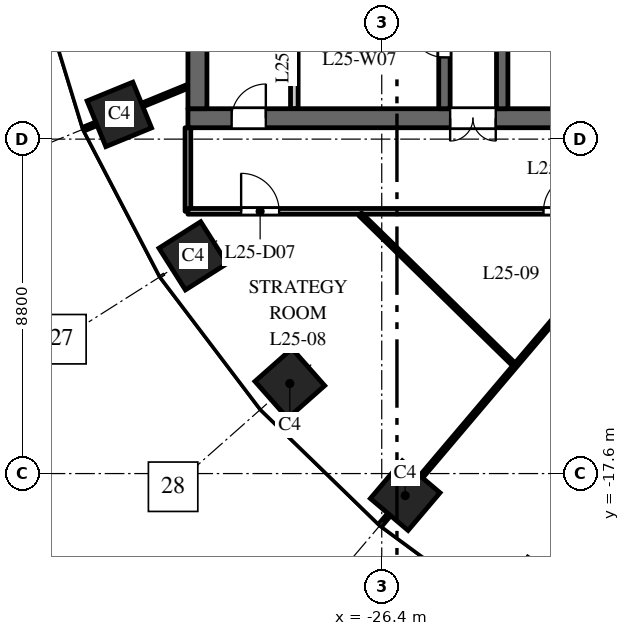
"""IFC4 building model, lengths in metres.
Left out: names, types, materials, properties, quantities, classifications, styles, units other than length and angle.
Written with IfcOpenShell. Run it as: python <this file> out.ifc"""

import sys

from ifc_helpers import new_model, si_unit, direction, frame, frame_2d, origin, origin_2d, place, context, subcontext, project, spatial, rectangle, extrude, element, fill, save


model = new_model("IFC4")
c1 = context("Model", 3, precision=1e-05, world=origin(), true_north=direction((0.0, 1.0)))
c2 = subcontext(c1, "Body", "Model", "MODEL_VIEW")
j1 = project(units=[si_unit("LENGTHUNIT", "METRE"), si_unit("PLANEANGLEUNIT", "RADIAN")], contexts=[c1])
p1 = place(None, origin())
s1 = spatial("IfcSite", under=j1, at=p1, CompositionType="ELEMENT")
p2 = place(p1, origin())
s2 = spatial("IfcBuilding", under=s1, at=p2, CompositionType="ELEMENT")
p3 = place(p2, frame((0.0, 0.0, 112.0)))
s3 = spatial("IfcBuildingStorey", under=s2, at=p3, CompositionType="ELEMENT", Elevation=112.0)
for number, where, z_axis, x_axis in (
    (1, (-33.305, -8.149, 0.0), (0.0, 0.0, 1.0), (0.379, -0.925, 0.0)),
    (2, (-31.365, -11.871, 0.0), (0.0, 0.0, 1.0), (0.535, -0.845, 0.0)),
    (3, (-28.819, -15.23, 0.0), (0.0, 0.0, 1.0), (0.663, -0.749, 0.0)),
    (4, (-25.783, -18.18, 0.0), (0.0, 0.0, 1.0), (0.763, -0.646, 0.0)),
):
    element("IfcColumn", number, at=place(p3, frame(where, z_axis=z_axis, x_axis=x_axis)), inside=s3, PredefinedType="COLUMN", context=c2, shape_type="SweptSolid", body=[
        extrude(rectangle(XDim=1.3, YDim=1.3, at=origin_2d()), origin(), (0.0, 0.0, 1.0), 4.0),
    ])
p4 = place(p3, frame((-16.5, -8.25, 0.0), z_axis=(0.0, 0.0, 1.0), x_axis=(-1.0, 0.0, 0.0)))
e5 = element("IfcWall", 5, at=p4, inside=s3, PredefinedType="SHEAR", context=c2, shape_type="SweptSolid", body=[
    extrude(rectangle(XDim=15.0, YDim=0.5, at=frame_2d((7.5, 0.0))), origin(), (0.0, 0.0, 1.0), 3.7),
])
p5 = place(p4, frame((6.9, 0.0, 0.0)))
e6 = element("IfcOpeningElement", 6, at=p5, cuts=e5, PredefinedType="OPENING", context=c2, shape_type="SweptSolid", body=[
    extrude(rectangle(XDim=1.2, YDim=2.1, at=frame_2d((0.6, 1.05))), frame((0.0, 0.26, 0.0), z_axis=(0.0, -1.0, 0.0), x_axis=(1.0, 0.0, 0.0)), (0.0, 0.0, 1.0), 0.52),
])
p6 = place(p4, frame((12.95, 0.0, 0.0)))
e7 = element("IfcOpeningElement", 7, at=p6, cuts=e5, PredefinedType="OPENING", context=c2, shape_type="SweptSolid", body=[
    extrude(rectangle(XDim=0.9, YDim=2.1, at=frame_2d((0.45, 1.05))), frame((0.0, 0.26, 0.0), z_axis=(0.0, -1.0, 0.0), x_axis=(1.0, 0.0, 0.0)), (0.0, 0.0, 1.0), 0.52),
])
p7 = place(p3, frame((-24.75, -8.0, 0.0), z_axis=(0.0, 0.0, 1.0), x_axis=(0.0, 1.0, 0.0)))
e8 = element("IfcWall", 8, at=p7, inside=s3, PredefinedType="SHEAR", context=c2, shape_type="SweptSolid", body=[
    extrude(rectangle(XDim=16.0, YDim=0.3, at=frame_2d((8.0, 0.0))), origin(), (0.0, 0.0, 1.0), 3.7),
])
p8 = place(p7, frame((4.425, 0.0, 0.0)))
e9 = element("IfcOpeningElement", 9, at=p8, cuts=e8, PredefinedType="OPENING", context=c2, shape_type="SweptSolid", body=[
    extrude(rectangle(XDim=1.1, YDim=2.1, at=frame_2d((0.55, 1.05))), frame((0.0, 0.16, 0.0), z_axis=(0.0, -1.0, 0.0), x_axis=(1.0, 0.0, 0.0)), (0.0, 0.0, 1.0), 0.32),
])
p9 = place(p7, frame((7.45, 0.0, 0.0)))
e10 = element("IfcOpeningElement", 10, at=p9, cuts=e8, PredefinedType="OPENING", context=c2, shape_type="SweptSolid", body=[
    extrude(rectangle(XDim=1.1, YDim=2.1, at=frame_2d((0.55, 1.05))), frame((0.0, 0.16, 0.0), z_axis=(0.0, -1.0, 0.0), x_axis=(1.0, 0.0, 0.0)), (0.0, 0.0, 1.0), 0.32),
])
p10 = place(p7, frame((10.425, 0.0, 0.0)))
e11 = element("IfcOpeningElement", 11, at=p10, cuts=e8, PredefinedType="OPENING", context=c2, shape_type="SweptSolid", body=[
    extrude(rectangle(XDim=1.2, YDim=2.1, at=frame_2d((0.6, 1.05))), frame((0.0, 0.16, 0.0), z_axis=(0.0, -1.0, 0.0), x_axis=(1.0, 0.0, 0.0)), (0.0, 0.0, 1.0), 0.32),
])
p11 = place(p7, frame((13.75, 0.0, 0.0)))
e12 = element("IfcOpeningElement", 12, at=p11, cuts=e8, PredefinedType="OPENING", context=c2, shape_type="SweptSolid", body=[
    extrude(rectangle(XDim=0.9, YDim=2.1, at=frame_2d((0.45, 1.05))), frame((0.0, 0.16, 0.0), z_axis=(0.0, -1.0, 0.0), x_axis=(1.0, 0.0, 0.0)), (0.0, 0.0, 1.0), 0.32),
])
p12 = place(p7, frame((1.35, 0.0, 0.0)))
e13 = element("IfcOpeningElement", 13, at=p12, cuts=e8, PredefinedType="OPENING", context=c2, shape_type="SweptSolid", body=[
    extrude(rectangle(XDim=0.9, YDim=2.1, at=frame_2d((0.45, 1.05))), frame((0.0, 0.16, 0.0), z_axis=(0.0, -1.0, 0.0), x_axis=(1.0, 0.0, 0.0)), (0.0, 0.0, 1.0), 0.32),
])
p13 = place(p3, frame((-31.25, -8.0, 0.0), z_axis=(0.0, 0.0, 1.0), x_axis=(0.0, 1.0, 0.0)))
e14 = element("IfcWall", 14, at=p13, inside=s3, PredefinedType="SHEAR", context=c2, shape_type="SweptSolid", body=[
    extrude(rectangle(XDim=16.0, YDim=0.5, at=frame_2d((8.0, 0.0))), origin(), (0.0, 0.0, 1.0), 3.7),
])
p14 = place(p3, frame((-28.7, -8.0, 0.0), z_axis=(0.0, 0.0, 1.0), x_axis=(0.0, 1.0, 0.0)))
e15 = element("IfcWall", 15, at=p14, inside=s3, PredefinedType="PARTITIONING", context=c2, shape_type="SweptSolid", body=[
    extrude(rectangle(XDim=3.25, YDim=0.2, at=frame_2d((1.625, 0.0))), origin(), (0.0, 0.0, 1.0), 3.7),
])
p15 = place(p3, frame((-23.23, -8.0, 0.0), z_axis=(0.0, 0.0, 1.0), x_axis=(0.0, 1.0, 0.0)))
e16 = element("IfcWall", 16, at=p15, inside=s3, PredefinedType="SHEAR", context=c2, shape_type="SweptSolid", body=[
    extrude(rectangle(XDim=7.875, YDim=0.3, at=frame_2d((3.938, 0.0))), origin(), (0.0, 0.0, 1.0), 3.7),
])
p16 = place(p15, frame((5.15, 0.0, 0.0)))
e17 = element("IfcOpeningElement", 17, at=p16, cuts=e16, PredefinedType="OPENING", context=c2, shape_type="SweptSolid", body=[
    extrude(rectangle(XDim=1.1, YDim=2.1, at=frame_2d((0.55, 1.05))), frame((0.0, 0.16, 0.0), z_axis=(0.0, -1.0, 0.0), x_axis=(1.0, 0.0, 0.0)), (0.0, 0.0, 1.0), 0.32),
])
p17 = place(p3, frame((-34.234, -8.53, 0.0), z_axis=(0.0, 0.0, 1.0), x_axis=(0.925344112436, 0.379128307542, 0.0)))
e18 = element("IfcWall", 18, at=p17, inside=s3, PredefinedType="PARTITIONING", context=c2, shape_type="SweptSolid", body=[
    extrude(rectangle(XDim=2.954, YDim=0.1, at=frame_2d((1.477, 0.0))), origin(), (0.0, 0.0, 1.0), 2.9),
])
p18 = place(p3, frame((-31.5, -10.7, 0.0), z_axis=(0.0, 0.0, 1.0), x_axis=(0.0, 1.0, 0.0)))
e19 = element("IfcWall", 19, at=p18, inside=s3, PredefinedType="PARTITIONING", context=c2, shape_type="SweptSolid", body=[
    extrude(rectangle(XDim=2.2, YDim=0.15, at=frame_2d((1.1, 0.0))), origin(), (0.0, 0.0, 1.0), 3.7),
])
p19 = place(p3, frame((-31.5, -10.7, 0.0), z_axis=(0.0, 0.0, 1.0), x_axis=(1.0, 0.0, 0.0)))
e20 = element("IfcWall", 20, at=p19, inside=s3, PredefinedType="PARTITIONING", context=c2, shape_type="SweptSolid", body=[
    extrude(rectangle(XDim=11.113, YDim=0.15, at=frame_2d((5.557, 0.0))), origin(), (0.0, 0.0, 1.0), 3.1),
])
p20 = place(p19, frame((1.4, 0.0, 0.0)))
e21 = element("IfcOpeningElement", 21, at=p20, cuts=e20, PredefinedType="OPENING", context=c2, shape_type="SweptSolid", body=[
    extrude(rectangle(XDim=1.0, YDim=2.1, at=frame_2d((0.5, 1.05))), frame((0.0, 0.085, 0.0), z_axis=(0.0, -1.0, 0.0), x_axis=(1.0, 0.0, 0.0)), (0.0, 0.0, 1.0), 0.17),
])
p21 = place(p19, frame((9.356, 0.0, 0.0)))
e22 = element("IfcOpeningElement", 22, at=p21, cuts=e20, PredefinedType="OPENING", context=c2, shape_type="SweptSolid", body=[
    extrude(rectangle(XDim=1.0, YDim=2.1, at=frame_2d((0.5, 1.05))), frame((0.0, 0.085, 0.0), z_axis=(0.0, -1.0, 0.0), x_axis=(1.0, 0.0, 0.0)), (0.0, 0.0, 1.0), 0.17),
])
p22 = place(p3, frame((-26.965, -10.778, 0.0), z_axis=(0.0, 0.0, 1.0), x_axis=(0.715118482903, -0.699003258512, 0.0)))
e23 = element("IfcWall", 23, at=p22, inside=s3, PredefinedType="PARTITIONING", context=c2, shape_type="SweptSolid", body=[
    extrude(rectangle(XDim=5.651, YDim=0.1, at=frame_2d((2.825, 0.0))), origin(), (0.0, 0.0, 1.0), 3.7),
])
p23 = place(p3, frame((-26.43, -18.945, 0.0), z_axis=(0.0, 0.0, 1.0), x_axis=(0.64633128205, 0.763056927, 0.0)))
e24 = element("IfcWall", 24, at=p23, inside=s3, PredefinedType="PARTITIONING", context=c2, shape_type="SweptSolid", body=[
    extrude(rectangle(XDim=10.069, YDim=0.1, at=frame_2d((5.034, 0.0))), origin(), (0.0, 0.0, 1.0), 3.7),
])
p24 = place(p5, origin())
e25 = element("IfcDoor", 25, at=p24, inside=s3, OperationType="DOUBLE_DOOR_DOUBLE_SWING", PredefinedType="DOOR", context=c2, shape_type="SweptSolid", body=[
    extrude(rectangle(XDim=1.2, YDim=2.1, at=frame_2d((0.6, 1.05))), frame((0.0, 0.025, 0.0), z_axis=(0.0, -1.0, 0.0), x_axis=(1.0, 0.0, 0.0)), (0.0, 0.0, 1.0), 0.05),
])
fill(e6, e25)
p25 = place(p12, origin())
e26 = element("IfcDoor", 26, at=p25, inside=s3, OperationType="SINGLE_SWING_LEFT", PredefinedType="DOOR", context=c2, shape_type="SweptSolid", body=[
    extrude(rectangle(XDim=0.9, YDim=2.1, at=frame_2d((0.45, 1.05))), frame((0.0, 0.025, 0.0), z_axis=(0.0, -1.0, 0.0), x_axis=(1.0, 0.0, 0.0)), (0.0, 0.0, 1.0), 0.05),
])
fill(e13, e26)
p26 = place(p6, origin())
e27 = element("IfcDoor", 27, at=p26, inside=s3, OperationType="SINGLE_SWING_LEFT", PredefinedType="DOOR", context=c2, shape_type="SweptSolid", body=[
    extrude(rectangle(XDim=0.9, YDim=2.1, at=frame_2d((0.45, 1.05))), frame((0.0, 0.025, 0.0), z_axis=(0.0, -1.0, 0.0), x_axis=(1.0, 0.0, 0.0)), (0.0, 0.0, 1.0), 0.05),
])
fill(e7, e27)
p27 = place(p20, origin())
e28 = element("IfcDoor", 28, at=p27, inside=s3, OperationType="SINGLE_SWING_LEFT", PredefinedType="DOOR", context=c2, shape_type="SweptSolid", body=[
    extrude(rectangle(XDim=1.0, YDim=2.1, at=frame_2d((0.5, 1.05))), frame((0.0, 0.025, 0.0), z_axis=(0.0, -1.0, 0.0), x_axis=(1.0, 0.0, 0.0)), (0.0, 0.0, 1.0), 0.05),
])
fill(e21, e28)
p28 = place(p21, origin())
e29 = element("IfcDoor", 29, at=p28, inside=s3, OperationType="SINGLE_SWING_RIGHT", PredefinedType="DOOR", context=c2, shape_type="SweptSolid", body=[
    extrude(rectangle(XDim=1.0, YDim=2.1, at=frame_2d((0.5, 1.05))), frame((0.0, 0.025, 0.0), z_axis=(0.0, -1.0, 0.0), x_axis=(1.0, 0.0, 0.0)), (0.0, 0.0, 1.0), 0.05),
])
fill(e22, e29)
save(model, sys.argv[1])
